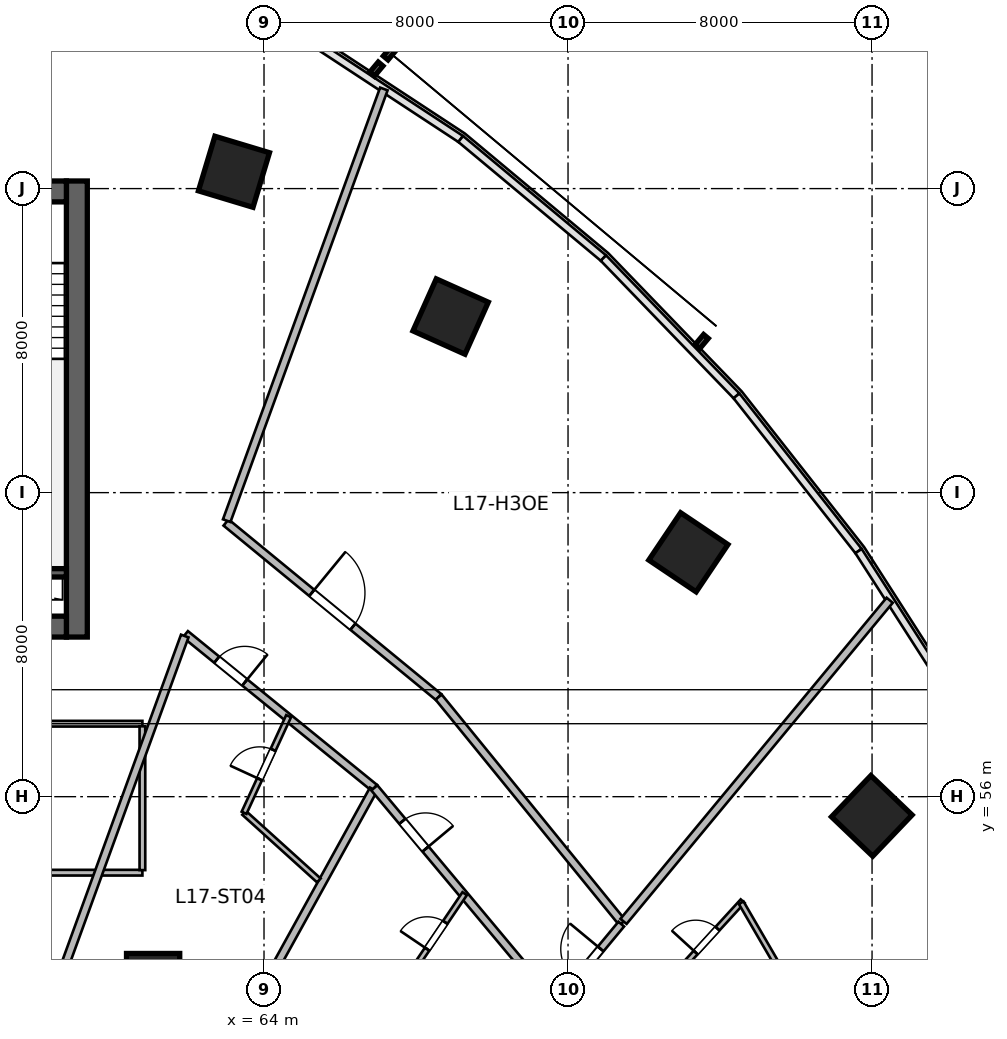
"""IFC4 building model, lengths in metres.
Left out: names, types, materials, properties, quantities, classifications, styles, units other than length and angle.
Written with IfcOpenShell. Run it as: python <this file> out.ifc"""

import sys

from ifc_helpers import new_model, si_unit, direction, frame, frame_2d, origin, origin_2d, place, context, subcontext, project, spatial, rectangle, circle, extrude, source, transform, mapped, element, fill, save


model = new_model("IFC4")
c1 = context("Model", 3, precision=1e-05, world=origin(), true_north=direction((0.0, 1.0)))
c2 = subcontext(c1, "Body", "Model", "MODEL_VIEW")
j1 = project(units=[si_unit("LENGTHUNIT", "METRE"), si_unit("PLANEANGLEUNIT", "RADIAN")], contexts=[c1])
p1 = place(None, origin())
s1 = spatial("IfcSite", under=j1, at=p1, CompositionType="ELEMENT")
p2 = place(p1, origin())
s2 = spatial("IfcBuilding", under=s1, at=p2, CompositionType="ELEMENT")
p3 = place(p2, frame((0.0, 0.0, 75.0)))
s3 = spatial("IfcBuildingStorey", under=s2, at=p3, CompositionType="ELEMENT", Elevation=75.0)
m1 = source(origin(), c2, "Body", "SweptSolid", [
    extrude(rectangle(XDim=12.0, YDim=0.55, at=frame_2d((6.0, 0.0))), origin(), (0.0, 0.0, 1.0), 3.6),
])
p4 = place(p3, frame((59.075, 60.2, 0.0), z_axis=(0.0, 0.0, 1.0), x_axis=(0.0, 1.0, 0.0)))
e1 = element("IfcWall", 1, at=p4, inside=s3, PredefinedType="SHEAR", context=c2, shape_type="MappedRepresentation", body=[
    mapped(m1, transform((0.0, 0.0, 0.0), scale=1.0)),
])
m2 = source(origin(), c2, "Body", "SweptSolid", [
    extrude(rectangle(XDim=21.6, YDim=0.55, at=frame_2d((10.8, 0.0))), origin(), (0.0, 0.0, 1.0), 3.6),
])
p5 = place(p3, frame((37.2, 60.475, 0.0), z_axis=(0.0, 0.0, 1.0), x_axis=(1.0, 0.0, 0.0)))
e2 = element("IfcWall", 2, at=p5, inside=s3, PredefinedType="SHEAR", context=c2, shape_type="MappedRepresentation", body=[
    mapped(m2, transform((0.0, 0.0, 0.0), scale=1.0)),
])
p6 = place(p5, frame((1.1, 0.0, 0.0)))
e3 = element("IfcOpeningElement", 3, at=p6, cuts=e2, PredefinedType="OPENING", context=c2, shape_type="SweptSolid", body=[
    extrude(rectangle(XDim=1.15, YDim=2.15, at=frame_2d((0.575, 1.075))), frame((0.0, 0.285, 0.0), z_axis=(0.0, -1.0, 0.0), x_axis=(1.0, 0.0, 0.0)), (0.0, 0.0, 1.0), 0.57),
])
p7 = place(p5, frame((19.5, 0.0, 0.0)))
e4 = element("IfcOpeningElement", 4, at=p7, cuts=e2, PredefinedType="OPENING", context=c2, shape_type="SweptSolid", body=[
    extrude(rectangle(XDim=0.9, YDim=2.1, at=frame_2d((0.45, 1.05))), frame((0.0, 0.285, 0.0), z_axis=(0.0, -1.0, 0.0), x_axis=(1.0, 0.0, 0.0)), (0.0, 0.0, 1.0), 0.57),
])
p8 = place(p5, frame((12.02, 0.0, 0.0)))
e5 = element("IfcOpeningElement", 5, at=p8, cuts=e2, PredefinedType="OPENING", context=c2, shape_type="SweptSolid", body=[
    extrude(rectangle(XDim=1.6, YDim=2.15, at=frame_2d((0.8, 1.075))), frame((0.0, 0.285, 0.0), z_axis=(0.0, -1.0, 0.0), x_axis=(1.0, 0.0, 0.0)), (0.0, 0.0, 1.0), 0.57),
])
p9 = place(p3, frame((37.2, 71.925, 0.0), z_axis=(0.0, 0.0, 1.0), x_axis=(1.0, 0.0, 0.0)))
e6 = element("IfcWall", 6, at=p9, inside=s3, PredefinedType="SHEAR", context=c2, shape_type="MappedRepresentation", body=[
    mapped(m2, transform((0.0, 0.0, 0.0), scale=1.0)),
])
p10 = place(p9, frame((1.2, 0.0, 0.0)))
e7 = element("IfcOpeningElement", 7, at=p10, cuts=e6, PredefinedType="OPENING", context=c2, shape_type="SweptSolid", body=[
    extrude(rectangle(XDim=0.9, YDim=2.1, at=frame_2d((0.45, 1.05))), frame((0.0, 0.285, 0.0), z_axis=(0.0, -1.0, 0.0), x_axis=(1.0, 0.0, 0.0)), (0.0, 0.0, 1.0), 0.57),
])
p11 = place(p9, frame((14.7, 0.0, 0.0)))
e8 = element("IfcOpeningElement", 8, at=p11, cuts=e6, PredefinedType="OPENING", context=c2, shape_type="SweptSolid", body=[
    extrude(rectangle(XDim=1.2, YDim=2.15, at=frame_2d((0.6, 1.075))), frame((0.0, 0.285, 0.0), z_axis=(0.0, -1.0, 0.0), x_axis=(1.0, 0.0, 0.0)), (0.0, 0.0, 1.0), 0.57),
])
p12 = place(p9, frame((4.15, 0.0, 0.0)))
e9 = element("IfcOpeningElement", 9, at=p12, cuts=e6, PredefinedType="OPENING", context=c2, shape_type="SweptSolid", body=[
    extrude(rectangle(XDim=1.3, YDim=2.15, at=frame_2d((0.65, 1.075))), frame((0.0, 0.285, 0.0), z_axis=(0.0, -1.0, 0.0), x_axis=(1.0, 0.0, 0.0)), (0.0, 0.0, 1.0), 0.57),
])
p13 = place(p9, frame((7.25, 0.0, 0.0)))
e10 = element("IfcOpeningElement", 10, at=p13, cuts=e6, PredefinedType="OPENING", context=c2, shape_type="SweptSolid", body=[
    extrude(rectangle(XDim=0.9, YDim=2.1, at=frame_2d((0.45, 1.05))), frame((0.0, 0.285, 0.0), z_axis=(0.0, -1.0, 0.0), x_axis=(1.0, 0.0, 0.0)), (0.0, 0.0, 1.0), 0.57),
])
p14 = place(p9, frame((10.95, 0.0, 0.0)))
e11 = element("IfcOpeningElement", 11, at=p14, cuts=e6, PredefinedType="OPENING", context=c2, shape_type="SweptSolid", body=[
    extrude(rectangle(XDim=0.9, YDim=2.1, at=frame_2d((0.45, 1.05))), frame((0.0, 0.285, 0.0), z_axis=(0.0, -1.0, 0.0), x_axis=(1.0, 0.0, 0.0)), (0.0, 0.0, 1.0), 0.57),
])
m3 = source(origin(), c2, "Body", "SweptSolid", [
    extrude(rectangle(XDim=3.27, YDim=0.22, at=frame_2d((1.635, 0.0))), origin(), (0.0, 0.0, 1.0), 3.6),
])
p15 = place(p3, frame((55.53, 61.89, 0.0), z_axis=(0.0, 0.0, 1.0), x_axis=(1.0, 0.0, 0.0)))
e12 = element("IfcWall", 12, at=p15, inside=s3, PredefinedType="SHEAR", context=c2, shape_type="MappedRepresentation", body=[
    mapped(m3, transform((0.0, 0.0, 0.0), scale=1.0)),
])
m4 = source(origin(), c2, "Body", "SweptSolid", [
    extrude(rectangle(XDim=1.5, YDim=1.5, at=origin_2d()), origin(), (0.0, 0.0, 1.0), 3.6),
])
p16 = place(p3, frame((63.209, 72.442, 0.0), z_axis=(0.0, 0.0, 1.0), x_axis=(0.288697611798, 0.957420330337, 0.0)))
e13 = element("IfcColumn", 13, at=p16, inside=s3, PredefinedType="COLUMN", context=c2, shape_type="MappedRepresentation", body=[
    mapped(m4, transform((0.0, 0.0, 0.0), scale=1.0)),
])
m5 = source(origin(), c2, "Body", "SweptSolid", [
    extrude(circle(Radius=0.7, at=origin_2d()), origin(), (0.0, 0.0, 1.0), 3.6),
])
p17 = place(p3, frame((61.082, 51.175, 0.0), z_axis=(0.0, 0.0, 1.0), x_axis=(0.409126902895, 0.912477494148, 0.0)))
e14 = element("IfcColumn", 14, at=p17, inside=s3, PredefinedType="COLUMN", context=c2, shape_type="MappedRepresentation", body=[
    mapped(m5, transform((0.0, 0.0, 0.0), scale=1.0)),
])
for number, where, z_axis, x_axis in (
    (15, (68.91, 68.633, 0.0), (0.0, 0.0, 1.0), (0.409, 0.912, 0.0)),
    (16, (75.167, 62.43, 0.0), (0.0, 0.0, 1.0), (0.558, 0.83, 0.0)),
    (17, (79.993, 55.494, 0.0), (0.0, 0.0, 1.0), (0.691, 0.723, 0.0)),
):
    element("IfcColumn", number, at=place(p3, frame(where, z_axis=z_axis, x_axis=x_axis)), inside=s3, PredefinedType="COLUMN", context=c2, shape_type="MappedRepresentation", body=[
        mapped(m4, transform((0.0, 0.0, 0.0), scale=1.0)),
    ])
m6 = source(origin(), c2, "Body", "SweptSolid", [
    extrude(rectangle(XDim=6.6, YDim=0.15, at=frame_2d((3.3, 0.0))), origin(), (0.0, 0.0, 1.0), 2.803),
])
p18 = place(p3, frame((54.2, 54.0, 0.0), z_axis=(0.0, 0.0, 1.0), x_axis=(1.0, 0.0, 0.0)))
e18 = element("IfcWall", 18, at=p18, inside=s3, PredefinedType="PARTITIONING", context=c2, shape_type="MappedRepresentation", body=[
    mapped(m6, transform((0.0, 0.0, 0.0), scale=1.0)),
])
m7 = source(origin(), c2, "Body", "SweptSolid", [
    extrude(rectangle(XDim=6.6, YDim=0.15, at=frame_2d((3.3, 0.0))), origin(), (0.0, 0.0, 1.0), 3.36),
])
p19 = place(p3, frame((54.2, 57.92, 0.0), z_axis=(0.0, 0.0, 1.0), x_axis=(1.0, 0.0, 0.0)))
e19 = element("IfcWall", 19, at=p19, inside=s3, PredefinedType="PARTITIONING", context=c2, shape_type="MappedRepresentation", body=[
    mapped(m7, transform((0.0, 0.0, 0.0), scale=1.0)),
])
p20 = place(p19, frame((2.825, 0.0, 0.0)))
e20 = element("IfcOpeningElement", 20, at=p20, cuts=e19, PredefinedType="OPENING", context=c2, shape_type="SweptSolid", body=[
    extrude(rectangle(XDim=0.95, YDim=2.1, at=frame_2d((0.475, 1.05))), frame((0.0, 0.085, 0.0), z_axis=(0.0, -1.0, 0.0), x_axis=(1.0, 0.0, 0.0)), (0.0, 0.0, 1.0), 0.17),
])
m8 = source(origin(), c2, "Body", "SweptSolid", [
    extrude(rectangle(XDim=3.785, YDim=0.15, at=frame_2d((1.893, 0.0))), origin(), (0.0, 0.0, 1.0), 3.36),
])
p21 = place(p3, frame((60.8, 54.067, 0.0), z_axis=(0.0, 0.0, 1.0), x_axis=(0.0, 1.0, 0.0)))
e21 = element("IfcWall", 21, at=p21, inside=s3, PredefinedType="PARTITIONING", context=c2, shape_type="MappedRepresentation", body=[
    mapped(m8, transform((0.0, 0.0, 0.0), scale=1.0)),
])
m9 = source(origin(), c2, "Body", "SweptSolid", [
    extrude(rectangle(XDim=7.237, YDim=0.21, at=frame_2d((3.618, 0.0))), origin(), (0.0, 0.0, 1.0), 3.36),
])
p22 = place(p3, frame((63.001, 63.214, 0.0), z_axis=(0.0, 0.0, 1.0), x_axis=(0.772813707793, -0.634632943557, 0.0)))
e22 = element("IfcWall", 22, at=p22, inside=s3, PredefinedType="PARTITIONING", context=c2, shape_type="MappedRepresentation", body=[
    mapped(m9, transform((0.0, 0.0, 0.0), scale=1.0)),
])
p23 = place(p22, frame((2.918, 0.0, 0.0)))
e23 = element("IfcOpeningElement", 23, at=p23, cuts=e22, PredefinedType="OPENING", context=c2, shape_type="SweptSolid", body=[
    extrude(rectangle(XDim=1.4, YDim=2.15, at=frame_2d((0.7, 1.075))), frame((0.0, 0.115, 0.0), z_axis=(0.0, -1.0, 0.0), x_axis=(1.0, 0.0, 0.0)), (0.0, 0.0, 1.0), 0.23),
])
m10 = source(origin(), c2, "Body", "SweptSolid", [
    extrude(rectangle(XDim=7.659, YDim=0.21, at=frame_2d((3.829, 0.0))), origin(), (0.0, 0.0, 1.0), 3.36),
])
p24 = place(p3, frame((68.594, 58.621, 0.0), z_axis=(0.0, 0.0, 1.0), x_axis=(0.631489868862, -0.775384127723, 0.0)))
e24 = element("IfcWall", 24, at=p24, inside=s3, PredefinedType="PARTITIONING", context=c2, shape_type="MappedRepresentation", body=[
    mapped(m10, transform((0.0, 0.0, 0.0), scale=1.0)),
])
m11 = source(origin(), c2, "Body", "SweptSolid", [
    extrude(rectangle(XDim=12.088, YDim=0.21, at=frame_2d((6.044, 0.0))), origin(), (0.0, 0.0, 1.0), 3.36),
])
p25 = place(p3, frame((63.019, 63.262, 0.0), z_axis=(0.0, 0.0, 1.0), x_axis=(0.34203007529, 0.939689005787, 0.0)))
e25 = element("IfcWall", 25, at=p25, inside=s3, PredefinedType="PARTITIONING", context=c2, shape_type="MappedRepresentation", body=[
    mapped(m11, transform((0.0, 0.0, 0.0), scale=1.0)),
])
m12 = source(origin(), c2, "Body", "SweptSolid", [
    extrude(rectangle(XDim=10.975, YDim=0.21, at=frame_2d((5.487, 0.0))), origin(), (0.0, 0.0, 1.0), 3.36),
])
p26 = place(p3, frame((73.46, 52.719, 0.0), z_axis=(0.0, 0.0, 1.0), x_axis=(0.638125265812, 0.769932558821, 0.0)))
e26 = element("IfcWall", 26, at=p26, inside=s3, PredefinedType="PARTITIONING", context=c2, shape_type="MappedRepresentation", body=[
    mapped(m12, transform((0.0, 0.0, 0.0), scale=1.0)),
])
m13 = source(origin(), c2, "Body", "SweptSolid", [
    extrude(rectangle(XDim=6.408, YDim=0.21, at=frame_2d((3.204, 0.0))), origin(), (0.0, 0.0, 1.0), 3.36),
])
p27 = place(p3, frame((61.931, 60.275, 0.0), z_axis=(0.0, 0.0, 1.0), x_axis=(0.775878552904, -0.630882295792, 0.0)))
e27 = element("IfcWall", 27, at=p27, inside=s3, PredefinedType="PARTITIONING", context=c2, shape_type="MappedRepresentation", body=[
    mapped(m13, transform((0.0, 0.0, 0.0), scale=1.0)),
])
p28 = place(p27, frame((1.063, 0.0, 0.0)))
e28 = element("IfcOpeningElement", 28, at=p28, cuts=e27, PredefinedType="OPENING", context=c2, shape_type="SweptSolid", body=[
    extrude(rectangle(XDim=0.95, YDim=2.15, at=frame_2d((0.475, 1.075))), frame((0.0, 0.115, 0.0), z_axis=(0.0, -1.0, 0.0), x_axis=(1.0, 0.0, 0.0)), (0.0, 0.0, 1.0), 0.23),
])
m14 = source(origin(), c2, "Body", "SweptSolid", [
    extrude(rectangle(XDim=12.196, YDim=0.21, at=frame_2d((6.098, 0.0))), origin(), (0.0, 0.0, 1.0), 3.36),
])
p29 = place(p3, frame((57.742, 48.766, 0.0), z_axis=(0.0, 0.0, 1.0), x_axis=(0.342022711534, 0.939691686031, 0.0)))
e29 = element("IfcWall", 29, at=p29, inside=s3, PredefinedType="PARTITIONING", context=c2, shape_type="MappedRepresentation", body=[
    mapped(m14, transform((0.0, 0.0, 0.0), scale=1.0)),
])
m15 = source(origin(), c2, "Body", "SweptSolid", [
    extrude(rectangle(XDim=11.692, YDim=0.21, at=frame_2d((5.846, 0.0))), origin(), (0.0, 0.0, 1.0), 2.99),
])
p30 = place(p3, frame((61.228, 45.954, 0.0), z_axis=(0.0, 0.0, 1.0), x_axis=(0.483398579324, 0.875400373262, 0.0)))
e30 = element("IfcWall", 30, at=p30, inside=s3, PredefinedType="PARTITIONING", context=c2, shape_type="MappedRepresentation", body=[
    mapped(m15, transform((0.0, 0.0, 0.0), scale=1.0)),
])
m16 = source(origin(), c2, "Body", "SweptSolid", [
    extrude(rectangle(XDim=2.653, YDim=0.14, at=frame_2d((1.327, 0.0))), origin(), (0.0, 0.0, 1.0), 3.36),
])
p31 = place(p3, frame((63.475, 55.576, 0.0), z_axis=(0.0, 0.0, 1.0), x_axis=(0.741731938744, -0.67069645224, 0.0)))
e31 = element("IfcWall", 31, at=p31, inside=s3, PredefinedType="PARTITIONING", context=c2, shape_type="MappedRepresentation", body=[
    mapped(m16, transform((0.0, 0.0, 0.0), scale=1.0)),
])
m17 = source(origin(), c2, "Body", "SweptSolid", [
    extrude(rectangle(XDim=2.799, YDim=0.14, at=frame_2d((1.4, 0.0))), origin(), (0.0, 0.0, 1.0), 3.36),
])
p32 = place(p3, frame((63.475, 55.576, 0.0), z_axis=(0.0, 0.0, 1.0), x_axis=(0.418626740412, 0.908158384981, 0.0)))
e32 = element("IfcWall", 32, at=p32, inside=s3, PredefinedType="PARTITIONING", context=c2, shape_type="MappedRepresentation", body=[
    mapped(m17, transform((0.0, 0.0, 0.0), scale=1.0)),
])
p33 = place(p32, frame((0.975, 0.0, 0.0)))
e33 = element("IfcOpeningElement", 33, at=p33, cuts=e32, PredefinedType="OPENING", context=c2, shape_type="SweptSolid", body=[
    extrude(rectangle(XDim=0.85, YDim=2.05, at=frame_2d((0.425, 1.025))), frame((0.0, 0.08, 0.0), z_axis=(0.0, -1.0, 0.0), x_axis=(1.0, 0.0, 0.0)), (0.0, 0.0, 1.0), 0.16),
])
m18 = source(origin(), c2, "Body", "SweptSolid", [
    extrude(rectangle(XDim=6.764, YDim=0.21, at=frame_2d((3.382, 0.0))), origin(), (0.0, 0.0, 1.0), 3.36),
])
p34 = place(p3, frame((66.904, 56.232, 0.0), z_axis=(0.0, 0.0, 1.0), x_axis=(0.641433176235, -0.767178910311, 0.0)))
e34 = element("IfcWall", 34, at=p34, inside=s3, PredefinedType="PARTITIONING", context=c2, shape_type="MappedRepresentation", body=[
    mapped(m18, transform((0.0, 0.0, 0.0), scale=1.0)),
])
p35 = place(p34, frame((1.148, 0.0, 0.0)))
e35 = element("IfcOpeningElement", 35, at=p35, cuts=e34, PredefinedType="OPENING", context=c2, shape_type="SweptSolid", body=[
    extrude(rectangle(XDim=0.95, YDim=2.15, at=frame_2d((0.475, 1.075))), frame((0.0, 0.115, 0.0), z_axis=(0.0, -1.0, 0.0), x_axis=(1.0, 0.0, 0.0)), (0.0, 0.0, 1.0), 0.23),
])
m19 = source(origin(), c2, "Body", "SweptSolid", [
    extrude(rectangle(XDim=2.673, YDim=0.14, at=frame_2d((1.336, 0.0))), origin(), (0.0, 0.0, 1.0), 2.644),
])
p36 = place(p3, frame((67.782, 51.234, 0.0), z_axis=(0.0, 0.0, 1.0), x_axis=(0.560399679065, 0.828222312972, 0.0)))
e36 = element("IfcWall", 36, at=p36, inside=s3, PredefinedType="PARTITIONING", context=c2, shape_type="MappedRepresentation", body=[
    mapped(m19, transform((0.0, 0.0, 0.0), scale=1.0)),
])
p37 = place(p36, frame((0.911, 0.0, 0.0)))
e37 = element("IfcOpeningElement", 37, at=p37, cuts=e36, PredefinedType="OPENING", context=c2, shape_type="SweptSolid", body=[
    extrude(rectangle(XDim=0.85, YDim=2.05, at=frame_2d((0.425, 1.025))), frame((0.0, 0.08, 0.0), z_axis=(0.0, -1.0, 0.0), x_axis=(1.0, 0.0, 0.0)), (0.0, 0.0, 1.0), 0.16),
])
m20 = source(origin(), c2, "Body", "SweptSolid", [
    extrude(rectangle(XDim=2.748, YDim=0.195, at=frame_2d((1.374, 0.0))), origin(), (0.0, 0.0, 1.0), 3.36),
])
p38 = place(p3, frame((71.647, 50.531, 0.0), z_axis=(0.0, 0.0, 1.0), x_axis=(0.638111168284, 0.769944242729, 0.0)))
e38 = element("IfcWall", 38, at=p38, inside=s3, PredefinedType="PARTITIONING", context=c2, shape_type="MappedRepresentation", body=[
    mapped(m20, transform((0.0, 0.0, 0.0), scale=1.0)),
])
p39 = place(p38, frame((0.849, 0.0, 0.0)))
e39 = element("IfcOpeningElement", 39, at=p39, cuts=e38, PredefinedType="OPENING", context=c2, shape_type="SweptSolid", body=[
    extrude(rectangle(XDim=1.05, YDim=2.15, at=frame_2d((0.525, 1.075))), frame((0.0, 0.107, 0.0), z_axis=(0.0, -1.0, 0.0), x_axis=(1.0, 0.0, 0.0)), (0.0, 0.0, 1.0), 0.215),
])
m21 = source(origin(), c2, "Body", "SweptSolid", [
    extrude(rectangle(XDim=2.812, YDim=0.14, at=frame_2d((1.406, 0.0))), origin(), (0.0, 0.0, 1.0), 3.36),
])
p40 = place(p3, frame((74.697, 51.177, 0.0), z_axis=(0.0, 0.0, 1.0), x_axis=(0.675119025852, 0.737708818527, 0.0)))
e40 = element("IfcWall", 40, at=p40, inside=s3, PredefinedType="PARTITIONING", context=c2, shape_type="MappedRepresentation", body=[
    mapped(m21, transform((0.0, 0.0, 0.0), scale=1.0)),
])
p41 = place(p40, frame((0.981, 0.0, 0.0)))
e41 = element("IfcOpeningElement", 41, at=p41, cuts=e40, PredefinedType="OPENING", context=c2, shape_type="SweptSolid", body=[
    extrude(rectangle(XDim=0.85, YDim=2.05, at=frame_2d((0.425, 1.025))), frame((0.0, 0.08, 0.0), z_axis=(0.0, -1.0, 0.0), x_axis=(1.0, 0.0, 0.0)), (0.0, 0.0, 1.0), 0.16),
])
m22 = source(origin(), c2, "Body", "SweptSolid", [
    extrude(rectangle(XDim=2.045, YDim=0.14, at=frame_2d((1.022, 0.0))), origin(), (0.0, 0.0, 1.0), 3.36),
])
p42 = place(p3, frame((76.557, 53.209, 0.0), z_axis=(0.0, 0.0, 1.0), x_axis=(0.5023112139, -0.864686905411, 0.0)))
e42 = element("IfcWall", 42, at=p42, inside=s3, PredefinedType="PARTITIONING", context=c2, shape_type="MappedRepresentation", body=[
    mapped(m22, transform((0.0, 0.0, 0.0), scale=1.0)),
])
m23 = source(origin(), c2, "Body", "SweptSolid", [
    extrude(rectangle(XDim=1.4, YDim=2.15, at=frame_2d((0.7, 1.075))), frame((0.0, 0.025, 0.0), z_axis=(0.0, -1.0, 0.0), x_axis=(1.0, 0.0, 0.0)), (0.0, 0.0, 1.0), 0.05),
])
p43 = place(p23, origin())
e43 = element("IfcDoor", 43, at=p43, inside=s3, OperationType="SINGLE_SWING_LEFT", PredefinedType="DOOR", context=c2, shape_type="MappedRepresentation", body=[
    mapped(m23, transform((0.0, 0.0, 0.0), scale=1.0)),
])
fill(e23, e43)
m24 = source(origin(), c2, "Body", "SweptSolid", [
    extrude(rectangle(XDim=0.95, YDim=2.15, at=frame_2d((0.475, 1.075))), frame((0.0, 0.025, 0.0), z_axis=(0.0, -1.0, 0.0), x_axis=(1.0, 0.0, 0.0)), (0.0, 0.0, 1.0), 0.05),
])
p44 = place(p28, origin())
e44 = element("IfcDoor", 44, at=p44, inside=s3, OperationType="SINGLE_SWING_RIGHT", PredefinedType="DOOR", context=c2, shape_type="MappedRepresentation", body=[
    mapped(m24, transform((0.0, 0.0, 0.0), scale=1.0)),
])
fill(e28, e44)
m25 = source(origin(), c2, "Body", "SweptSolid", [
    extrude(rectangle(XDim=0.85, YDim=2.05, at=frame_2d((0.425, 1.025))), frame((0.0, 0.025, 0.0), z_axis=(0.0, -1.0, 0.0), x_axis=(1.0, 0.0, 0.0)), (0.0, 0.0, 1.0), 0.05),
])
p45 = place(p33, origin())
e45 = element("IfcDoor", 45, at=p45, inside=s3, OperationType="SINGLE_SWING_LEFT", PredefinedType="DOOR", context=c2, shape_type="MappedRepresentation", body=[
    mapped(m25, transform((0.0, 0.0, 0.0), scale=1.0)),
])
fill(e33, e45)
p46 = place(p35, origin())
e46 = element("IfcDoor", 46, at=p46, inside=s3, OperationType="SINGLE_SWING_RIGHT", PredefinedType="DOOR", context=c2, shape_type="MappedRepresentation", body=[
    mapped(m24, transform((0.0, 0.0, 0.0), scale=1.0)),
])
fill(e35, e46)
p47 = place(p37, origin())
e47 = element("IfcDoor", 47, at=p47, inside=s3, OperationType="SINGLE_SWING_LEFT", PredefinedType="DOOR", context=c2, shape_type="MappedRepresentation", body=[
    mapped(m25, transform((0.0, 0.0, 0.0), scale=1.0)),
])
fill(e37, e47)
m26 = source(origin(), c2, "Body", "SweptSolid", [
    extrude(rectangle(XDim=1.05, YDim=2.15, at=frame_2d((0.525, 1.075))), frame((0.0, 0.025, 0.0), z_axis=(0.0, -1.0, 0.0), x_axis=(1.0, 0.0, 0.0)), (0.0, 0.0, 1.0), 0.05),
])
p48 = place(p39, origin())
e48 = element("IfcDoor", 48, at=p48, inside=s3, OperationType="SINGLE_SWING_RIGHT", PredefinedType="DOOR", context=c2, shape_type="MappedRepresentation", body=[
    mapped(m26, transform((0.0, 0.0, 0.0), scale=1.0)),
])
fill(e39, e48)
p49 = place(p41, origin())
e49 = element("IfcDoor", 49, at=p49, inside=s3, OperationType="SINGLE_SWING_LEFT", PredefinedType="DOOR", context=c2, shape_type="MappedRepresentation", body=[
    mapped(m25, transform((0.0, 0.0, 0.0), scale=1.0)),
])
fill(e41, e49)
save(model, sys.argv[1])
